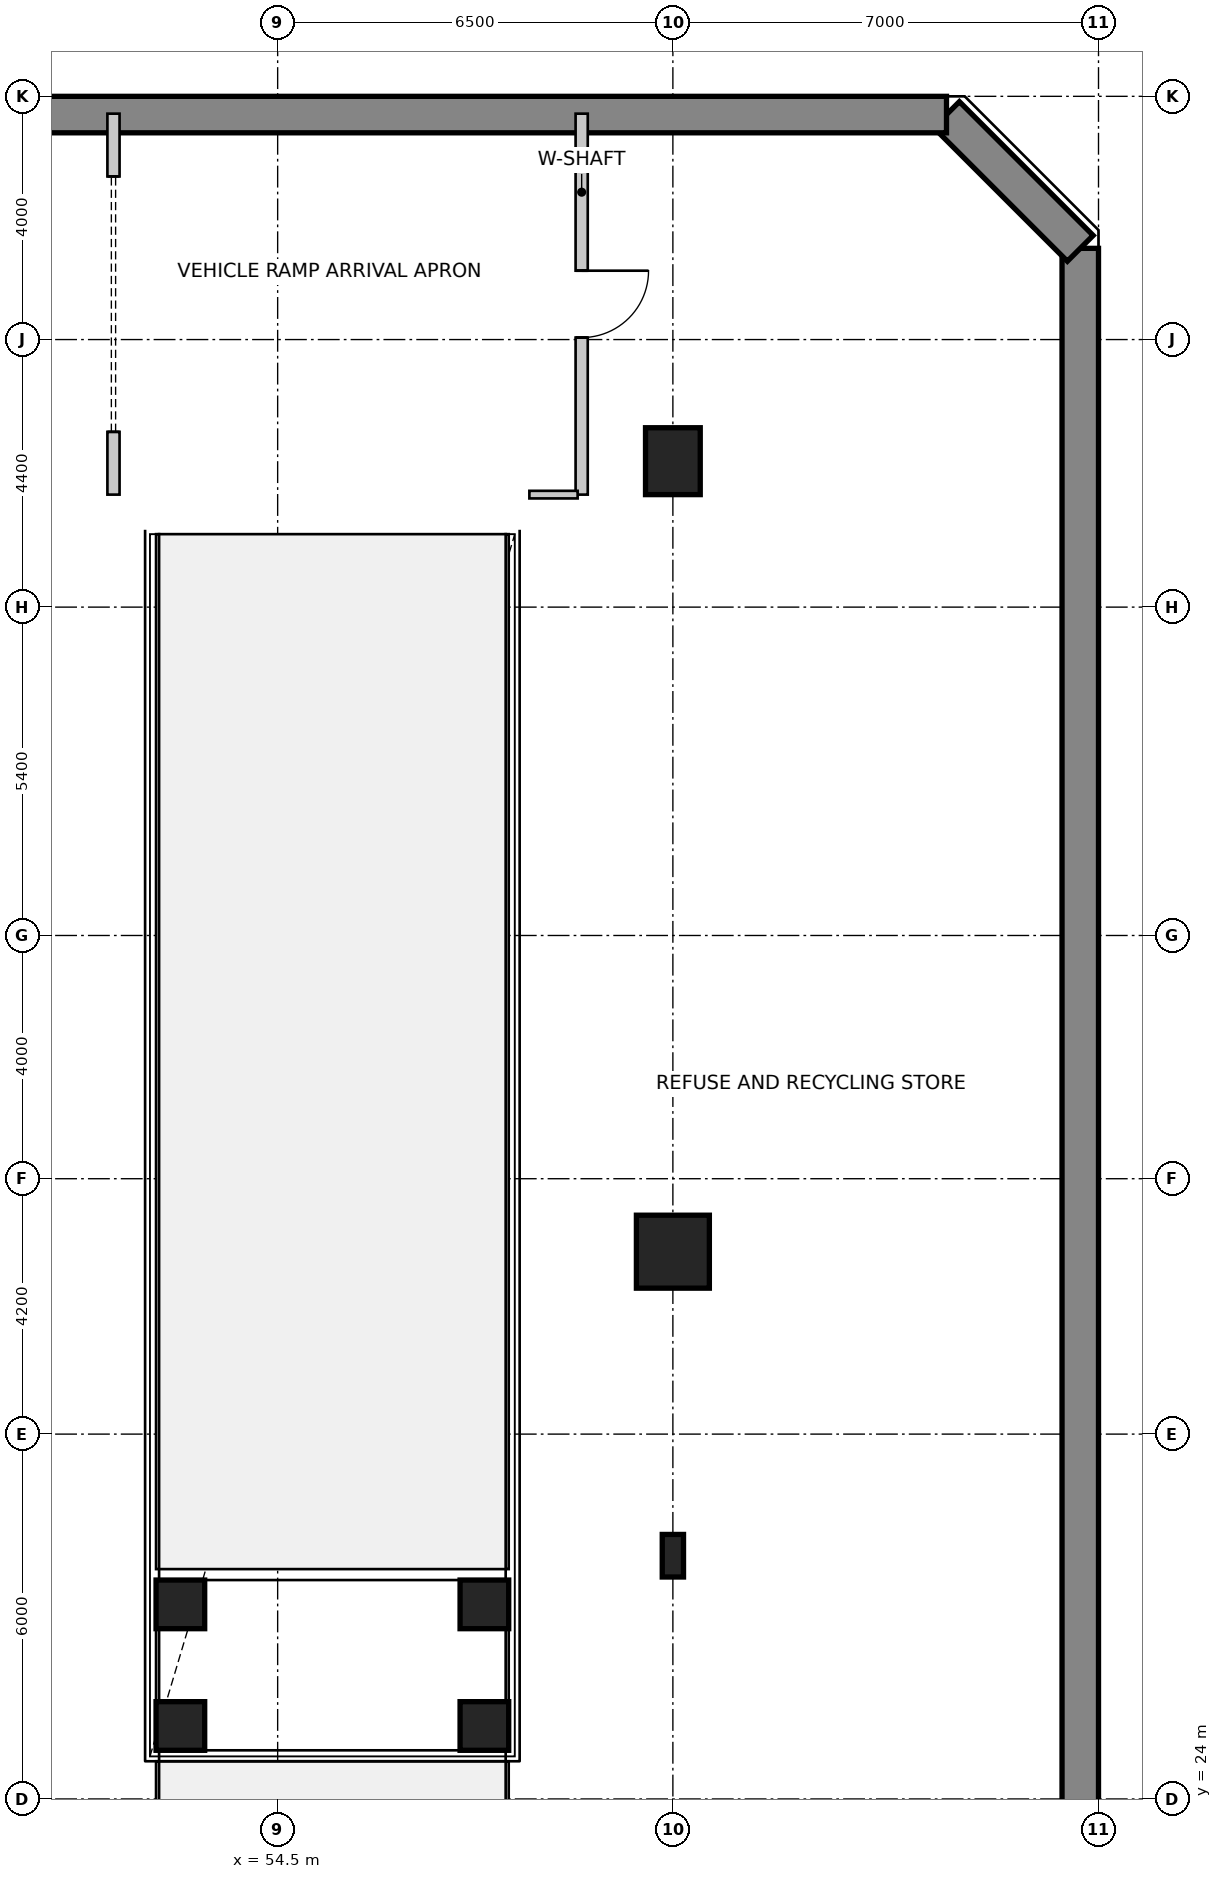
"""IFC4 building model, lengths in metres.
Left out: names, types, materials, properties, quantities, classifications, styles, units other than length and angle.
Written with IfcOpenShell. Run it as: python <this file> out.ifc"""

import sys

from ifc_helpers import new_model, si_unit, direction, frame, frame_2d, origin, origin_2d, place, context, subcontext, project, spatial, rectangle, extrude, source, transform, mapped, element, fill, save


model = new_model("IFC4")
c1 = context("Model", 3, precision=1e-05, world=origin(), true_north=direction((0.0, 1.0)))
c2 = subcontext(c1, "Body", "Model", "MODEL_VIEW")
j1 = project(units=[si_unit("LENGTHUNIT", "METRE"), si_unit("PLANEANGLEUNIT", "RADIAN")], contexts=[c1])
p1 = place(None, origin())
s1 = spatial("IfcSite", under=j1, at=p1, CompositionType="ELEMENT")
p2 = place(p1, origin())
s2 = spatial("IfcBuilding", under=s1, at=p2, CompositionType="ELEMENT")
p3 = place(p2, frame((0.0, 0.0, -5.4)))
s3 = spatial("IfcBuildingStorey", under=s2, at=p3, CompositionType="ELEMENT", Elevation=-5.4)
p4 = place(p3, frame((67.7, 4.5, 0.0), z_axis=(0.0, 0.0, 1.0), x_axis=(0.0, 1.0, 0.0)))
e1 = element("IfcWall", 1, at=p4, inside=s3, PredefinedType="SHEAR", context=c2, shape_type="SweptSolid", body=[
    extrude(rectangle(XDim=45.0, YDim=0.6, at=frame_2d((22.5, 0.0))), origin(), (0.0, 0.0, 1.0), 5.4),
])
p5 = place(p3, frame((67.7, 49.5, 0.0), z_axis=(0.0, 0.0, 1.0), x_axis=(-0.707106781187, 0.707106781187, 0.0)))
e2 = element("IfcWall", 2, at=p5, inside=s3, PredefinedType="SHEAR", context=c2, shape_type="SweptSolid", body=[
    extrude(rectangle(XDim=3.111, YDim=0.6, at=frame_2d((1.556, 0.0))), origin(), (0.0, 0.0, 1.0), 5.4),
])
p6 = place(p3, frame((65.5, 51.7, 0.0), z_axis=(0.0, 0.0, 1.0), x_axis=(-1.0, 0.0, 0.0)))
e3 = element("IfcWall", 3, at=p6, inside=s3, PredefinedType="SHEAR", context=c2, shape_type="SweptSolid", body=[
    extrude(rectangle(XDim=61.0, YDim=0.6, at=frame_2d((30.5, 0.0))), origin(), (0.0, 0.0, 1.0), 5.4),
])
m1 = source(origin(), c2, "Body", "SweptSolid", [
    extrude(rectangle(XDim=1.2, YDim=1.2, at=origin_2d()), origin(), (0.0, 0.0, 1.0), 5.4),
])
p7 = place(p3, frame((61.0, 33.0, 0.0), z_axis=(0.0, 0.0, 1.0), x_axis=(1.0, 0.0, 0.0)))
e4 = element("IfcColumn", 4, at=p7, inside=s3, PredefinedType="COLUMN", context=c2, shape_type="MappedRepresentation", body=[
    mapped(m1, transform((0.0, 0.0, 0.0), scale=1.0)),
])
m2 = source(origin(), c2, "Body", "SweptSolid", [
    extrude(rectangle(XDim=0.9, YDim=1.1, at=origin_2d()), origin(), (0.0, 0.0, 1.0), 5.4),
])
p8 = place(p3, frame((61.0, 46.0, 0.0), z_axis=(0.0, 0.0, 1.0), x_axis=(1.0, 0.0, 0.0)))
e5 = element("IfcColumn", 5, at=p8, inside=s3, PredefinedType="COLUMN", context=c2, shape_type="MappedRepresentation", body=[
    mapped(m2, transform((0.0, 0.0, 0.0), scale=1.0)),
])
m3 = source(origin(), c2, "Body", "SweptSolid", [
    extrude(rectangle(XDim=0.35, YDim=0.7, at=origin_2d()), origin(), (0.0, 0.0, 1.0), 5.4),
])
p9 = place(p3, frame((61.0, 28.0, 0.0), z_axis=(0.0, 0.0, 1.0), x_axis=(1.0, 0.0, 0.0)))
e6 = element("IfcColumn", 6, at=p9, inside=s3, PredefinedType="PILASTER", context=c2, shape_type="MappedRepresentation", body=[
    mapped(m3, transform((0.0, 0.0, 0.0), scale=1.0)),
])
m4 = source(origin(), c2, "Body", "SweptSolid", [
    extrude(rectangle(XDim=0.8, YDim=0.8, at=origin_2d()), origin(), (0.0, 0.0, 1.0), 2.32),
])
for number, where, z_axis, x_axis in (
    (7, (52.9, 25.2, 0.0), (0.0, 0.0, 1.0), (1.0, 0.0, 0.0)),
    (8, (52.9, 27.2, 0.0), (0.0, 0.0, 1.0), (1.0, 0.0, 0.0)),
    (9, (57.9, 25.2, 0.0), (0.0, 0.0, 1.0), (1.0, 0.0, 0.0)),
    (10, (57.9, 27.2, 0.0), (0.0, 0.0, 1.0), (1.0, 0.0, 0.0)),
):
    element("IfcColumn", number, at=place(p3, frame(where, z_axis=z_axis, x_axis=x_axis)), inside=s3, PredefinedType="COLUMN", context=c2, shape_type="MappedRepresentation", body=[
        mapped(m4, transform((0.0, 0.0, 0.0), scale=1.0)),
    ])
p10 = place(p3, frame((51.8, 45.45, 0.0), z_axis=(0.0, 0.0, 1.0), x_axis=(0.0, 1.0, 0.0)))
e11 = element("IfcWall", 11, at=p10, inside=s3, PredefinedType="SOLIDWALL", context=c2, shape_type="SweptSolid", body=[
    extrude(rectangle(XDim=6.265, YDim=0.2, at=frame_2d((3.133, 0.0))), origin(), (0.0, 0.0, 1.0), 4.142),
])
m5 = source(origin(), c2, "Body", "SweptSolid", [
    extrude(rectangle(XDim=4.2, YDim=3.2, at=frame_2d((2.1, 1.6))), frame((0.0, 0.11, 0.0), z_axis=(0.0, -1.0, 0.0), x_axis=(1.0, 0.0, 0.0)), (0.0, 0.0, 1.0), 0.22),
])
p11 = place(p10, frame((1.032, 0.0, 0.0)))
e12 = element("IfcOpeningElement", 12, at=p11, cuts=e11, PredefinedType="OPENING", context=c2, shape_type="MappedRepresentation", body=[
    mapped(m5, transform((0.0, 0.0, 0.0), scale=1.0)),
])
p12 = place(p3, frame((59.5, 51.715, 0.0), z_axis=(0.0, 0.0, 1.0), x_axis=(0.0, -1.0, 0.0)))
e13 = element("IfcWall", 13, at=p12, inside=s3, PredefinedType="SOLIDWALL", context=c2, shape_type="SweptSolid", body=[
    extrude(rectangle(XDim=6.265, YDim=0.2, at=frame_2d((3.133, 0.0))), origin(), (0.0, 0.0, 1.0), 4.142),
])
m6 = source(origin(), c2, "Body", "SweptSolid", [
    extrude(rectangle(XDim=1.1, YDim=2.15, at=frame_2d((0.55, 1.075))), frame((0.0, 0.11, 0.0), z_axis=(0.0, -1.0, 0.0), x_axis=(1.0, 0.0, 0.0)), (0.0, 0.0, 1.0), 0.22),
])
p13 = place(p12, frame((2.583, 0.0, 0.0)))
e14 = element("IfcOpeningElement", 14, at=p13, cuts=e13, PredefinedType="OPENING", context=c2, shape_type="MappedRepresentation", body=[
    mapped(m6, transform((0.0, 0.0, 0.0), scale=1.0)),
])
p14 = place(p3, frame((59.434, 45.45, 0.0), z_axis=(0.0, 0.0, 1.0), x_axis=(-1.0, 0.0, 0.0)))
e15 = element("IfcWall", 15, at=p14, inside=s3, PredefinedType="PARTITIONING", context=c2, shape_type="SweptSolid", body=[
    extrude(rectangle(XDim=0.794, YDim=0.125, at=frame_2d((0.397, 0.0))), origin(), (0.0, 0.0, 1.0), 5.1),
])
m7 = source(origin(), c2, "Body", "SweptSolid", [
    extrude(rectangle(XDim=4.2, YDim=3.2, at=frame_2d((2.1, 1.6))), frame((0.0, 0.025, 0.0), z_axis=(0.0, -1.0, 0.0), x_axis=(1.0, 0.0, 0.0)), (0.0, 0.0, 1.0), 0.05),
])
p15 = place(p11, origin())
e16 = element("IfcDoor", 16, at=p15, inside=s3, OperationType="ROLLINGUP", PredefinedType="GATE", context=c2, shape_type="MappedRepresentation", body=[
    mapped(m7, transform((0.0, 0.0, 0.0), scale=1.0)),
])
fill(e12, e16)
m8 = source(origin(), c2, "Body", "SweptSolid", [
    extrude(rectangle(XDim=1.1, YDim=2.15, at=frame_2d((0.55, 1.075))), frame((0.0, 0.025, 0.0), z_axis=(0.0, -1.0, 0.0), x_axis=(1.0, 0.0, 0.0)), (0.0, 0.0, 1.0), 0.05),
])
p16 = place(p13, origin())
e17 = element("IfcDoor", 17, at=p16, inside=s3, OperationType="SINGLE_SWING_LEFT", PredefinedType="DOOR", context=c2, shape_type="MappedRepresentation", body=[
    mapped(m8, transform((0.0, 0.0, 0.0), scale=1.0)),
])
fill(e14, e17)
save(model, sys.argv[1])
